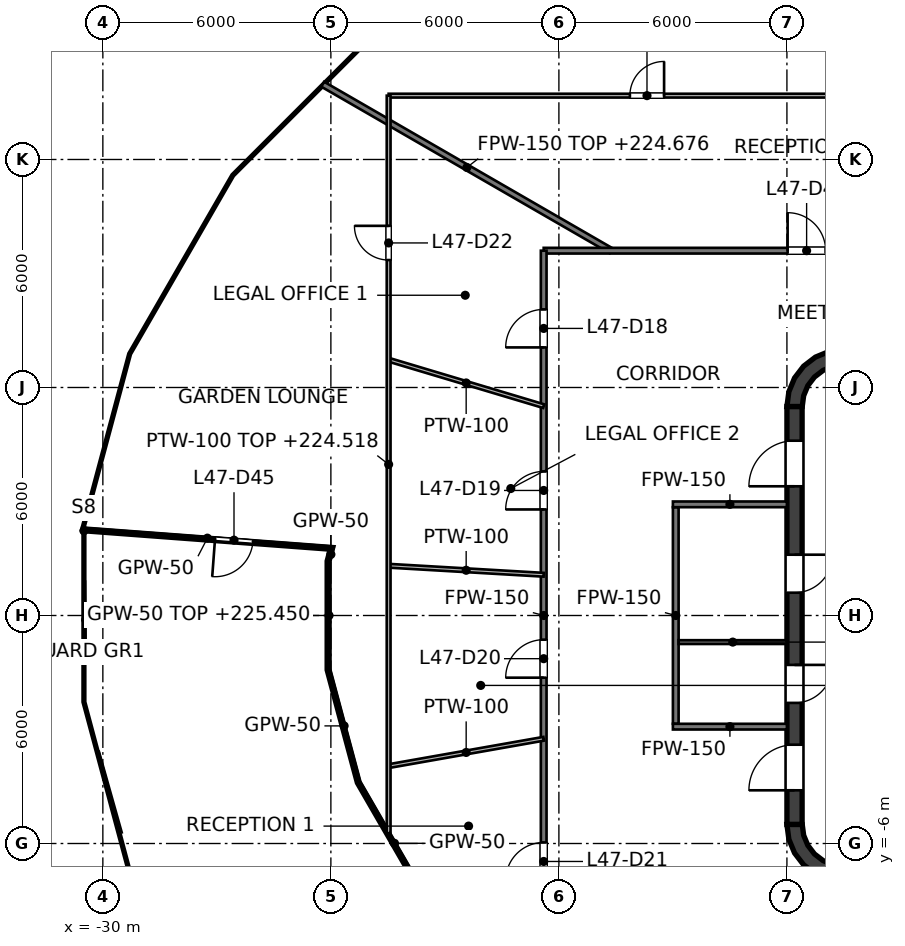
"""IFC4 building model, lengths in metres.
Left out: names, types, materials, properties, quantities, classifications, styles, units other than length and angle.
Written with IfcOpenShell. Run it as: python <this file> out.ifc"""

import sys

from ifc_helpers import new_model, si_unit, direction, frame, frame_2d, origin, place, context, subcontext, project, spatial, polyline, rectangle, outline, extrude, element, fill, save


model = new_model("IFC4")
c1 = context("Model", 3, precision=1e-05, world=origin(), true_north=direction((0.0, 1.0)))
c2 = subcontext(c1, "Body", "Model", "MODEL_VIEW")
j1 = project(units=[si_unit("LENGTHUNIT", "METRE"), si_unit("PLANEANGLEUNIT", "RADIAN")], contexts=[c1])
p1 = place(None, origin())
s1 = spatial("IfcSite", under=j1, at=p1, CompositionType="ELEMENT")
p2 = place(p1, origin())
s2 = spatial("IfcBuilding", under=s1, at=p2, CompositionType="ELEMENT")
p3 = place(p2, frame((0.0, 0.0, 221.6)))
s3 = spatial("IfcBuildingStorey", under=s2, at=p3, CompositionType="ELEMENT", Elevation=221.6)
p4 = place(p3, frame((-11.8, -5.5, 0.0), z_axis=(0.0, 0.0, 1.0), x_axis=(0.0, 1.0, 0.0)))
e1 = element("IfcWall", 1, at=p4, inside=s3, PredefinedType="SHEAR", context=c2, shape_type="SweptSolid", body=[
    extrude(rectangle(XDim=11.0, YDim=0.4, at=frame_2d((5.5, 0.0))), origin(), (0.0, 0.0, 1.0), 4.0),
])
p5 = place(p4, frame((3.2, 0.0, 0.0)))
e2 = element("IfcOpeningElement", 2, at=p5, cuts=e1, PredefinedType="OPENING", context=c2, shape_type="SweptSolid", body=[
    extrude(rectangle(XDim=1.0, YDim=2.1, at=frame_2d((0.5, 1.05))), frame((0.0, 0.2, 0.0), z_axis=(0.0, -1.0, 0.0), x_axis=(1.0, 0.0, 0.0)), (0.0, 0.0, 1.0), 0.4),
])
p6 = place(p4, frame((6.1, 0.0, 0.0)))
e3 = element("IfcOpeningElement", 3, at=p6, cuts=e1, PredefinedType="OPENING", context=c2, shape_type="SweptSolid", body=[
    extrude(rectangle(XDim=1.0, YDim=2.1, at=frame_2d((0.5, 1.05))), frame((0.0, 0.2, 0.0), z_axis=(0.0, -1.0, 0.0), x_axis=(1.0, 0.0, 0.0)), (0.0, 0.0, 1.0), 0.4),
])
p7 = place(p4, frame((0.9, 0.0, 0.0)))
e4 = element("IfcOpeningElement", 4, at=p7, cuts=e1, PredefinedType="OPENING", context=c2, shape_type="SweptSolid", body=[
    extrude(rectangle(XDim=1.2, YDim=2.1, at=frame_2d((0.6, 1.05))), frame((0.0, 0.2, 0.0), z_axis=(0.0, -1.0, 0.0), x_axis=(1.0, 0.0, 0.0)), (0.0, 0.0, 1.0), 0.4),
])
p8 = place(p4, frame((8.9, 0.0, 0.0)))
e5 = element("IfcOpeningElement", 5, at=p8, cuts=e1, PredefinedType="OPENING", context=c2, shape_type="SweptSolid", body=[
    extrude(rectangle(XDim=1.2, YDim=2.1, at=frame_2d((0.6, 1.05))), frame((0.0, 0.2, 0.0), z_axis=(0.0, -1.0, 0.0), x_axis=(1.0, 0.0, 0.0)), (0.0, 0.0, 1.0), 0.4),
])
p9 = place(p3, origin())
e6 = element("IfcWall", 6, at=p9, inside=s3, PredefinedType="SHEAR", context=c2, shape_type="SweptSolid", body=[
    extrude(outline(polyline([(-12.0, 5.5), (-11.596, 5.5), (-11.559, 5.784), (-11.45, 6.048), (-11.275, 6.275), (-11.048, 6.45), (-10.784, 6.559), (-10.5, 6.596), (-10.5, 7.0), (-10.888, 6.949), (-11.25, 6.799), (-11.561, 6.561), (-11.799, 6.25), (-11.949, 5.888), (-12.0, 5.5)])), origin(), (0.0, 0.0, 1.0), 4.0),
])
e7 = element("IfcWall", 7, at=p9, inside=s3, PredefinedType="SHEAR", context=c2, shape_type="SweptSolid", body=[
    extrude(outline(polyline([(-10.5, -7.0), (-10.5, -6.596), (-10.784, -6.559), (-11.048, -6.45), (-11.275, -6.275), (-11.45, -6.048), (-11.559, -5.784), (-11.596, -5.5), (-12.0, -5.5), (-11.949, -5.888), (-11.799, -6.25), (-11.561, -6.561), (-11.25, -6.799), (-10.888, -6.949), (-10.5, -7.0)])), origin(), (0.0, 0.0, 1.0), 4.0),
])
p10 = place(p3, frame((-14.925, -2.85, 0.0), z_axis=(0.0, 0.0, 1.0), x_axis=(0.0, 1.0, 0.0)))
e8 = element("IfcWall", 8, at=p10, inside=s3, PredefinedType="PARTITIONING", context=c2, shape_type="SweptSolid", body=[
    extrude(rectangle(XDim=5.7, YDim=0.15, at=frame_2d((2.85, 0.0))), origin(), (0.0, 0.0, 1.0), 2.918),
])
for number, where, z_axis, x_axis in (
    (9, (-15.0, 2.925, 0.0), (0.0, 0.0, 1.0), (1.0, 0.0, 0.0)),
    (10, (-15.0, -2.925, 0.0), (0.0, 0.0, 1.0), (1.0, 0.0, 0.0)),
):
    element("IfcWall", number, at=place(p3, frame(where, z_axis=z_axis, x_axis=x_axis)), inside=s3, PredefinedType="PARTITIONING", context=c2, shape_type="SweptSolid", body=[
        extrude(rectangle(XDim=3.0, YDim=0.15, at=frame_2d((1.5, 0.0))), origin(), (0.0, 0.0, 1.0), 2.918),
    ])
p11 = place(p3, frame((-14.85, -0.7, 0.0), z_axis=(0.0, 0.0, 1.0), x_axis=(1.0, 0.0, 0.0)))
e11 = element("IfcWall", 11, at=p11, inside=s3, PredefinedType="PARTITIONING", context=c2, shape_type="SweptSolid", body=[
    extrude(rectangle(XDim=2.85, YDim=0.1, at=frame_2d((1.425, 0.0))), origin(), (0.0, 0.0, 1.0), 2.918),
])
p12 = place(p3, frame((-24.214, 13.98, 0.0), z_axis=(0.0, 0.0, 1.0), x_axis=(0.866025463095, -0.499999897272, 0.0)))
e12 = element("IfcWall", 12, at=p12, inside=s3, PredefinedType="PARTITIONING", context=c2, shape_type="SweptSolid", body=[
    extrude(rectangle(XDim=8.76, YDim=0.15, at=frame_2d((4.38, 0.0))), origin(), (0.0, 0.0, 1.0), 3.076),
])
p13 = place(p3, frame((-18.4, 9.6, 0.0), z_axis=(0.0, 0.0, 1.0), x_axis=(1.0, 0.0, 0.0)))
e13 = element("IfcWall", 13, at=p13, inside=s3, PredefinedType="PARTITIONING", context=c2, shape_type="SweptSolid", body=[
    extrude(rectangle(XDim=36.8, YDim=0.15, at=frame_2d((18.4, 0.0))), origin(), (0.0, 0.0, 1.0), 2.927),
])
p14 = place(p13, frame((30.793, 0.0, 0.0)))
e14 = element("IfcOpeningElement", 14, at=p14, cuts=e13, PredefinedType="OPENING", context=c2, shape_type="SweptSolid", body=[
    extrude(rectangle(XDim=1.0, YDim=2.1, at=frame_2d((0.5, 1.05))), frame((0.0, 0.075, 0.0), z_axis=(0.0, -1.0, 0.0), x_axis=(1.0, 0.0, 0.0)), (0.0, 0.0, 1.0), 0.15),
])
p15 = place(p13, frame((24.84, 0.0, 0.0)))
e15 = element("IfcOpeningElement", 15, at=p15, cuts=e13, PredefinedType="OPENING", context=c2, shape_type="SweptSolid", body=[
    extrude(rectangle(XDim=1.0, YDim=2.1, at=frame_2d((0.5, 1.05))), frame((0.0, 0.075, 0.0), z_axis=(0.0, -1.0, 0.0), x_axis=(1.0, 0.0, 0.0)), (0.0, 0.0, 1.0), 0.15),
])
p16 = place(p13, frame((21.106, 0.0, 0.0)))
e16 = element("IfcOpeningElement", 16, at=p16, cuts=e13, PredefinedType="OPENING", context=c2, shape_type="SweptSolid", body=[
    extrude(rectangle(XDim=1.0, YDim=2.1, at=frame_2d((0.5, 1.05))), frame((0.0, 0.075, 0.0), z_axis=(0.0, -1.0, 0.0), x_axis=(1.0, 0.0, 0.0)), (0.0, 0.0, 1.0), 0.15),
])
p17 = place(p13, frame((17.46, 0.0, 0.0)))
e17 = element("IfcOpeningElement", 17, at=p17, cuts=e13, PredefinedType="OPENING", context=c2, shape_type="SweptSolid", body=[
    extrude(rectangle(XDim=1.0, YDim=2.1, at=frame_2d((0.5, 1.05))), frame((0.0, 0.075, 0.0), z_axis=(0.0, -1.0, 0.0), x_axis=(1.0, 0.0, 0.0)), (0.0, 0.0, 1.0), 0.15),
])
p18 = place(p13, frame((13.497, 0.0, 0.0)))
e18 = element("IfcOpeningElement", 18, at=p18, cuts=e13, PredefinedType="OPENING", context=c2, shape_type="SweptSolid", body=[
    extrude(rectangle(XDim=1.0, YDim=2.1, at=frame_2d((0.5, 1.05))), frame((0.0, 0.075, 0.0), z_axis=(0.0, -1.0, 0.0), x_axis=(1.0, 0.0, 0.0)), (0.0, 0.0, 1.0), 0.15),
])
p19 = place(p13, frame((6.418, 0.0, 0.0)))
e19 = element("IfcOpeningElement", 19, at=p19, cuts=e13, PredefinedType="OPENING", context=c2, shape_type="SweptSolid", body=[
    extrude(rectangle(XDim=1.0, YDim=2.1, at=frame_2d((0.5, 1.05))), frame((0.0, 0.075, 0.0), z_axis=(0.0, -1.0, 0.0), x_axis=(1.0, 0.0, 0.0)), (0.0, 0.0, 1.0), 0.15),
])
p20 = place(p3, frame((-18.4, -9.6, 0.0), z_axis=(0.0, 0.0, 1.0), x_axis=(0.0, 1.0, 0.0)))
e20 = element("IfcWall", 20, at=p20, inside=s3, PredefinedType="PARTITIONING", context=c2, shape_type="SweptSolid", body=[
    extrude(rectangle(XDim=19.2, YDim=0.15, at=frame_2d((9.6, 0.0))), origin(), (0.0, 0.0, 1.0), 2.918),
])
p21 = place(p20, frame((16.655, 0.0, 0.0)))
e21 = element("IfcOpeningElement", 21, at=p21, cuts=e20, PredefinedType="OPENING", context=c2, shape_type="SweptSolid", body=[
    extrude(rectangle(XDim=1.0, YDim=2.1, at=frame_2d((0.5, 1.05))), frame((0.0, 0.075, 0.0), z_axis=(0.0, -1.0, 0.0), x_axis=(1.0, 0.0, 0.0)), (0.0, 0.0, 1.0), 0.15),
])
p22 = place(p20, frame((12.39, 0.0, 0.0)))
e22 = element("IfcOpeningElement", 22, at=p22, cuts=e20, PredefinedType="OPENING", context=c2, shape_type="SweptSolid", body=[
    extrude(rectangle(XDim=1.0, YDim=2.1, at=frame_2d((0.5, 1.05))), frame((0.0, 0.075, 0.0), z_axis=(0.0, -1.0, 0.0), x_axis=(1.0, 0.0, 0.0)), (0.0, 0.0, 1.0), 0.15),
])
p23 = place(p20, frame((7.964, 0.0, 0.0)))
e23 = element("IfcOpeningElement", 23, at=p23, cuts=e20, PredefinedType="OPENING", context=c2, shape_type="SweptSolid", body=[
    extrude(rectangle(XDim=1.0, YDim=2.1, at=frame_2d((0.5, 1.05))), frame((0.0, 0.075, 0.0), z_axis=(0.0, -1.0, 0.0), x_axis=(1.0, 0.0, 0.0)), (0.0, 0.0, 1.0), 0.15),
])
p24 = place(p20, frame((2.627, 0.0, 0.0)))
e24 = element("IfcOpeningElement", 24, at=p24, cuts=e20, PredefinedType="OPENING", context=c2, shape_type="SweptSolid", body=[
    extrude(rectangle(XDim=1.0, YDim=2.1, at=frame_2d((0.5, 1.05))), frame((0.0, 0.075, 0.0), z_axis=(0.0, -1.0, 0.0), x_axis=(1.0, 0.0, 0.0)), (0.0, 0.0, 1.0), 0.15),
])
p25 = place(p3, frame((-24.048, -1.426, 0.0), z_axis=(0.0, 0.0, 1.0), x_axis=(0.258635126036, -0.965975088488, 0.0)))
e25 = element("IfcWall", 25, at=p25, inside=s3, PredefinedType="PARTITIONING", context=c2, shape_type="SweptSolid", body=[
    extrude(rectangle(XDim=3.062, YDim=0.05, at=frame_2d((1.531, 0.0))), origin(), (0.0, 0.0, 1.0), 2.918),
])
p26 = place(p3, frame((-23.256, -4.384, 0.0), z_axis=(0.0, 0.0, 1.0), x_axis=(0.499985652865, -0.866033686948, 0.0)))
e26 = element("IfcWall", 26, at=p26, inside=s3, PredefinedType="PARTITIONING", context=c2, shape_type="SweptSolid", body=[
    extrude(rectangle(XDim=3.72, YDim=0.05, at=frame_2d((1.86, 0.0))), origin(), (0.0, 0.0, 1.0), 2.918),
])
p27 = place(p3, frame((-30.548, 2.282, 0.0), z_axis=(0.0, 0.0, 1.0), x_axis=(0.997220325615, -0.074509208697, 0.0)))
e27 = element("IfcWall", 27, at=p27, inside=s3, PredefinedType="PARTITIONING", context=c2, shape_type="SweptSolid", body=[
    extrude(rectangle(XDim=6.615, YDim=0.05, at=frame_2d((3.308, 0.0))), origin(), (0.0, 0.0, 1.0), 2.918),
])
p28 = place(p27, frame((3.51, 0.0, 0.0)))
e28 = element("IfcOpeningElement", 28, at=p28, cuts=e27, PredefinedType="OPENING", context=c2, shape_type="SweptSolid", body=[
    extrude(rectangle(XDim=1.0, YDim=2.1, at=frame_2d((0.5, 1.05))), frame((0.0, 0.025, 0.0), z_axis=(0.0, -1.0, 0.0), x_axis=(1.0, 0.0, 0.0)), (0.0, 0.0, 1.0), 0.05),
])
p29 = place(p3, frame((-24.048, 1.427, 0.0), z_axis=(0.0, 0.0, 1.0), x_axis=(0.259202654617, 0.965822956778, 0.0)))
e29 = element("IfcWall", 29, at=p29, inside=s3, PredefinedType="PARTITIONING", context=c2, shape_type="SweptSolid", body=[
    extrude(rectangle(XDim=0.375, YDim=0.05, at=frame_2d((0.188, 0.0))), origin(), (0.0, 0.0, 1.0), 2.918),
])
p30 = place(p3, frame((-24.048, -1.426, 0.0), z_axis=(0.0, 0.0, 1.0), x_axis=(0.0, 1.0, 0.0)))
e30 = element("IfcWall", 30, at=p30, inside=s3, PredefinedType="PARTITIONING", context=c2, shape_type="SweptSolid", body=[
    extrude(rectangle(XDim=2.853, YDim=0.05, at=frame_2d((1.427, 0.0))), origin(), (0.0, 0.0, 1.0), 3.85),
])
p31 = place(p3, frame((-22.48, 6.73, 0.0), z_axis=(0.0, 0.0, 1.0), x_axis=(0.958024854744, -0.286685154295, 0.0)))
e31 = element("IfcWall", 31, at=p31, inside=s3, PredefinedType="PARTITIONING", context=c2, shape_type="SweptSolid", body=[
    extrude(rectangle(XDim=4.259, YDim=0.1, at=frame_2d((2.129, 0.0))), origin(), (0.0, 0.0, 1.0), 3.85),
])
p32 = place(p3, frame((-22.48, 1.309, 0.0), z_axis=(0.0, 0.0, 1.0), x_axis=(0.998316342586, -0.058004138861, 0.0)))
e32 = element("IfcWall", 32, at=p32, inside=s3, PredefinedType="PARTITIONING", context=c2, shape_type="SweptSolid", body=[
    extrude(rectangle(XDim=4.087, YDim=0.1, at=frame_2d((2.043, 0.0))), origin(), (0.0, 0.0, 1.0), 3.85),
])
p33 = place(p3, frame((-22.48, 13.68, 0.0), z_axis=(0.0, 0.0, 1.0), x_axis=(1.0, 0.0, 0.0)))
e33 = element("IfcWall", 33, at=p33, inside=s3, PredefinedType="PARTITIONING", context=c2, shape_type="SweptSolid", body=[
    extrude(rectangle(XDim=44.96, YDim=0.1, at=frame_2d((22.48, 0.0))), origin(), (0.0, 0.0, 1.0), 2.927),
])
p34 = place(p33, frame((20.954, 0.0, 0.0)))
e34 = element("IfcOpeningElement", 34, at=p34, cuts=e33, PredefinedType="OPENING", context=c2, shape_type="SweptSolid", body=[
    extrude(rectangle(XDim=1.8, YDim=2.1, at=frame_2d((0.9, 1.05))), frame((0.0, 0.05, 0.0), z_axis=(0.0, -1.0, 0.0), x_axis=(1.0, 0.0, 0.0)), (0.0, 0.0, 1.0), 0.1),
])
p35 = place(p33, frame((6.348, 0.0, 0.0)))
e35 = element("IfcOpeningElement", 35, at=p35, cuts=e33, PredefinedType="OPENING", context=c2, shape_type="SweptSolid", body=[
    extrude(rectangle(XDim=0.9, YDim=2.1, at=frame_2d((0.45, 1.05))), frame((0.0, 0.05, 0.0), z_axis=(0.0, -1.0, 0.0), x_axis=(1.0, 0.0, 0.0)), (0.0, 0.0, 1.0), 0.1),
])
p36 = place(p3, frame((-22.48, -3.964, 0.0), z_axis=(0.0, 0.0, 1.0), x_axis=(0.984775252653, 0.173832395604, 0.0)))
e36 = element("IfcWall", 36, at=p36, inside=s3, PredefinedType="PARTITIONING", context=c2, shape_type="SweptSolid", body=[
    extrude(rectangle(XDim=4.143, YDim=0.1, at=frame_2d((2.072, 0.0))), origin(), (0.0, 0.0, 1.0), 3.85),
])
p37 = place(p3, frame((-22.48, -5.728, 0.0), z_axis=(0.0, 0.0, 1.0), x_axis=(0.0, 1.0, 0.0)))
e37 = element("IfcWall", 37, at=p37, inside=s3, PredefinedType="PARTITIONING", context=c2, shape_type="SweptSolid", body=[
    extrude(rectangle(XDim=19.408, YDim=0.1, at=frame_2d((9.704, 0.0))), origin(), (0.0, 0.0, 1.0), 2.918),
])
p38 = place(p37, frame((15.082, 0.0, 0.0)))
e38 = element("IfcOpeningElement", 38, at=p38, cuts=e37, PredefinedType="OPENING", context=c2, shape_type="SweptSolid", body=[
    extrude(rectangle(XDim=0.9, YDim=2.1, at=frame_2d((0.45, 1.05))), frame((0.0, 0.05, 0.0), z_axis=(0.0, -1.0, 0.0), x_axis=(1.0, 0.0, 0.0)), (0.0, 0.0, 1.0), 0.1),
])
p39 = place(p5, origin())
e39 = element("IfcDoor", 39, at=p39, inside=s3, OperationType="SINGLE_SWING_RIGHT", PredefinedType="DOOR", context=c2, shape_type="SweptSolid", body=[
    extrude(rectangle(XDim=1.0, YDim=2.1, at=frame_2d((0.5, 1.05))), frame((0.0, 0.025, 0.0), z_axis=(0.0, -1.0, 0.0), x_axis=(1.0, 0.0, 0.0)), (0.0, 0.0, 1.0), 0.05),
])
fill(e2, e39)
p40 = place(p6, origin())
e40 = element("IfcDoor", 40, at=p40, inside=s3, OperationType="SINGLE_SWING_RIGHT", PredefinedType="DOOR", context=c2, shape_type="SweptSolid", body=[
    extrude(rectangle(XDim=1.0, YDim=2.1, at=frame_2d((0.5, 1.05))), frame((0.0, 0.025, 0.0), z_axis=(0.0, -1.0, 0.0), x_axis=(1.0, 0.0, 0.0)), (0.0, 0.0, 1.0), 0.05),
])
fill(e3, e40)
p41 = place(p7, origin())
e41 = element("IfcDoor", 41, at=p41, inside=s3, OperationType="SINGLE_SWING_LEFT", PredefinedType="DOOR", context=c2, shape_type="SweptSolid", body=[
    extrude(rectangle(XDim=1.2, YDim=2.1, at=frame_2d((0.6, 1.05))), frame((0.0, 0.025, 0.0), z_axis=(0.0, -1.0, 0.0), x_axis=(1.0, 0.0, 0.0)), (0.0, 0.0, 1.0), 0.05),
])
fill(e4, e41)
p42 = place(p8, origin())
e42 = element("IfcDoor", 42, at=p42, inside=s3, OperationType="SINGLE_SWING_LEFT", PredefinedType="DOOR", context=c2, shape_type="SweptSolid", body=[
    extrude(rectangle(XDim=1.2, YDim=2.1, at=frame_2d((0.6, 1.05))), frame((0.0, 0.025, 0.0), z_axis=(0.0, -1.0, 0.0), x_axis=(1.0, 0.0, 0.0)), (0.0, 0.0, 1.0), 0.05),
])
fill(e5, e42)
p43 = place(p21, origin())
e43 = element("IfcDoor", 43, at=p43, inside=s3, OperationType="SINGLE_SWING_LEFT", PredefinedType="DOOR", context=c2, shape_type="SweptSolid", body=[
    extrude(rectangle(XDim=1.0, YDim=2.1, at=frame_2d((0.5, 1.05))), frame((0.0, 0.025, 0.0), z_axis=(0.0, -1.0, 0.0), x_axis=(1.0, 0.0, 0.0)), (0.0, 0.0, 1.0), 0.05),
])
fill(e21, e43)
p44 = place(p22, origin())
e44 = element("IfcDoor", 44, at=p44, inside=s3, OperationType="SINGLE_SWING_LEFT", PredefinedType="DOOR", context=c2, shape_type="SweptSolid", body=[
    extrude(rectangle(XDim=1.0, YDim=2.1, at=frame_2d((0.5, 1.05))), frame((0.0, 0.025, 0.0), z_axis=(0.0, -1.0, 0.0), x_axis=(1.0, 0.0, 0.0)), (0.0, 0.0, 1.0), 0.05),
])
fill(e22, e44)
p45 = place(p23, origin())
e45 = element("IfcDoor", 45, at=p45, inside=s3, OperationType="SINGLE_SWING_LEFT", PredefinedType="DOOR", context=c2, shape_type="SweptSolid", body=[
    extrude(rectangle(XDim=1.0, YDim=2.1, at=frame_2d((0.5, 1.05))), frame((0.0, 0.025, 0.0), z_axis=(0.0, -1.0, 0.0), x_axis=(1.0, 0.0, 0.0)), (0.0, 0.0, 1.0), 0.05),
])
fill(e23, e45)
p46 = place(p24, origin())
e46 = element("IfcDoor", 46, at=p46, inside=s3, OperationType="SINGLE_SWING_LEFT", PredefinedType="DOOR", context=c2, shape_type="SweptSolid", body=[
    extrude(rectangle(XDim=1.0, YDim=2.1, at=frame_2d((0.5, 1.05))), frame((0.0, 0.025, 0.0), z_axis=(0.0, -1.0, 0.0), x_axis=(1.0, 0.0, 0.0)), (0.0, 0.0, 1.0), 0.05),
])
fill(e24, e46)
p47 = place(p38, origin())
e47 = element("IfcDoor", 47, at=p47, inside=s3, OperationType="SINGLE_SWING_RIGHT", PredefinedType="DOOR", context=c2, shape_type="SweptSolid", body=[
    extrude(rectangle(XDim=0.9, YDim=2.1, at=frame_2d((0.45, 1.05))), frame((0.0, 0.025, 0.0), z_axis=(0.0, -1.0, 0.0), x_axis=(1.0, 0.0, 0.0)), (0.0, 0.0, 1.0), 0.05),
])
fill(e38, e47)
p48 = place(p19, origin())
e48 = element("IfcDoor", 48, at=p48, inside=s3, OperationType="SINGLE_SWING_LEFT", PredefinedType="DOOR", context=c2, shape_type="SweptSolid", body=[
    extrude(rectangle(XDim=1.0, YDim=2.1, at=frame_2d((0.5, 1.05))), frame((0.0, 0.025, 0.0), z_axis=(0.0, -1.0, 0.0), x_axis=(1.0, 0.0, 0.0)), (0.0, 0.0, 1.0), 0.05),
])
fill(e19, e48)
p49 = place(p35, origin())
e49 = element("IfcDoor", 49, at=p49, inside=s3, OperationType="SINGLE_SWING_RIGHT", PredefinedType="DOOR", context=c2, shape_type="SweptSolid", body=[
    extrude(rectangle(XDim=0.9, YDim=2.1, at=frame_2d((0.45, 1.05))), frame((0.0, 0.025, 0.0), z_axis=(0.0, -1.0, 0.0), x_axis=(1.0, 0.0, 0.0)), (0.0, 0.0, 1.0), 0.05),
])
fill(e35, e49)
p50 = place(p28, origin())
e50 = element("IfcDoor", 50, at=p50, inside=s3, OperationType="SINGLE_SWING_LEFT", PredefinedType="DOOR", context=c2, shape_type="SweptSolid", body=[
    extrude(rectangle(XDim=1.0, YDim=2.1, at=frame_2d((0.5, 1.05))), frame((0.0, 0.025, 0.0), z_axis=(0.0, -1.0, 0.0), x_axis=(1.0, 0.0, 0.0)), (0.0, 0.0, 1.0), 0.05),
])
fill(e28, e50)
save(model, sys.argv[1])
